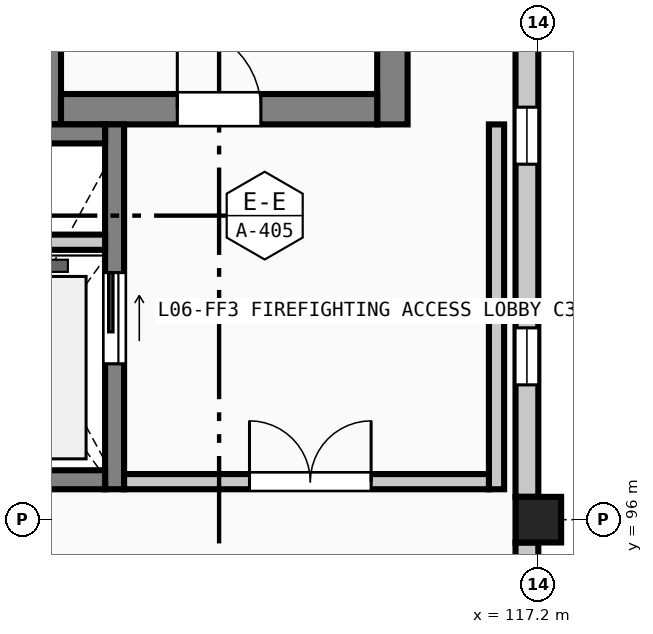
"""IFC4 building model, lengths in metres.
Left out: names, types, materials, properties, quantities, classifications, styles, units other than length and angle.
Written with IfcOpenShell. Run it as: python <this file> out.ifc"""

import sys

from ifc_helpers import new_model, si_unit, direction, frame, frame_2d, origin, origin_2d, place, context, subcontext, project, spatial, rectangle, extrude, element, fill, save


model = new_model("IFC4")
c1 = context("Model", 3, precision=1e-05, world=origin(), true_north=direction((0.0, 1.0)))
c2 = subcontext(c1, "Body", "Model", "MODEL_VIEW")
j1 = project(units=[si_unit("LENGTHUNIT", "METRE"), si_unit("PLANEANGLEUNIT", "RADIAN")], contexts=[c1])
p1 = place(None, origin())
s1 = spatial("IfcSite", under=j1, at=p1, CompositionType="ELEMENT")
p2 = place(p1, origin())
s2 = spatial("IfcBuilding", under=s1, at=p2, CompositionType="ELEMENT")
p3 = place(p2, frame((0.0, 0.0, 27.84)))
s3 = spatial("IfcBuildingStorey", under=s2, at=p3, CompositionType="ELEMENT", Elevation=27.84)
p4 = place(p3, frame((117.2, 96.0, 0.0), z_axis=(0.0, 0.0, 1.0), x_axis=(1.0, 0.0, 0.0)))
e1 = element("IfcColumn", 1, at=p4, inside=s3, PredefinedType="COLUMN", context=c2, shape_type="SweptSolid", body=[
    extrude(rectangle(XDim=0.6, YDim=0.6, at=origin_2d()), origin(), (0.0, 0.0, 1.0), 4.48),
])
for number, where, z_axis, x_axis in (
    (2, (110.72, 101.2, 0.0), (0.0, 0.0, 1.0), (0.0, 1.0, 0.0)),
    (3, (115.28, 110.4, 0.0), (0.0, 0.0, 1.0), (0.0, -1.0, 0.0)),
):
    element("IfcWall", number, at=place(p3, frame(where, z_axis=z_axis, x_axis=x_axis)), inside=s3, PredefinedType="SHEAR", context=c2, shape_type="SweptSolid", body=[
        extrude(rectangle(XDim=9.2, YDim=0.4, at=frame_2d((4.6, 0.0))), origin(), (0.0, 0.0, 1.0), 4.28),
    ])
p5 = place(p3, frame((115.08, 101.4, 0.0), z_axis=(0.0, 0.0, 1.0), x_axis=(-1.0, 0.0, 0.0)))
e4 = element("IfcWall", 4, at=p5, inside=s3, PredefinedType="SHEAR", context=c2, shape_type="SweptSolid", body=[
    extrude(rectangle(XDim=4.16, YDim=0.4, at=frame_2d((2.08, 0.0))), origin(), (0.0, 0.0, 1.0), 4.28),
])
p6 = place(p5, frame((1.53, 0.0, 0.0)))
e5 = element("IfcOpeningElement", 5, at=p6, cuts=e4, PredefinedType="OPENING", context=c2, shape_type="SweptSolid", body=[
    extrude(rectangle(XDim=1.1, YDim=2.2, at=frame_2d((0.55, 1.1))), frame((0.0, 0.21, 0.0), z_axis=(0.0, -1.0, 0.0), x_axis=(1.0, 0.0, 0.0)), (0.0, 0.0, 1.0), 0.42),
])
p7 = place(p3, frame((111.625, 101.2, 0.0), z_axis=(0.0, 0.0, 1.0), x_axis=(0.0, -1.0, 0.0)))
e6 = element("IfcWall", 6, at=p7, inside=s3, PredefinedType="SOLIDWALL", context=c2, shape_type="SweptSolid", body=[
    extrude(rectangle(XDim=4.8, YDim=0.25, at=frame_2d((2.4, 0.0))), origin(), (0.0, 0.0, 1.0), 4.28),
])
p8 = place(p7, frame((1.95, 0.0, 0.0)))
e7 = element("IfcOpeningElement", 7, at=p8, cuts=e6, PredefinedType="OPENING", context=c2, shape_type="SweptSolid", body=[
    extrude(rectangle(XDim=1.2, YDim=2.2, at=frame_2d((0.6, 1.1))), frame((0.0, 0.135, 0.0), z_axis=(0.0, -1.0, 0.0), x_axis=(1.0, 0.0, 0.0)), (0.0, 0.0, 1.0), 0.27),
])
for number, where, z_axis, x_axis in (
    (8, (111.5, 96.525, 0.0), (0.0, 0.0, 1.0), (-1.0, 0.0, 0.0)),
    (9, (109.4, 101.075, 0.0), (0.0, 0.0, 1.0), (1.0, 0.0, 0.0)),
):
    element("IfcWall", number, at=place(p3, frame(where, z_axis=z_axis, x_axis=x_axis)), inside=s3, PredefinedType="SOLIDWALL", context=c2, shape_type="SweptSolid", body=[
        extrude(rectangle(XDim=2.1, YDim=0.25, at=frame_2d((1.05, 0.0))), origin(), (0.0, 0.0, 1.0), 4.28),
    ])
p9 = place(p3, frame((109.4, 99.65, 0.0), z_axis=(0.0, 0.0, 1.0), x_axis=(1.0, 0.0, 0.0)))
e10 = element("IfcWall", 10, at=p9, inside=s3, PredefinedType="SOLIDWALL", context=c2, shape_type="SweptSolid", body=[
    extrude(rectangle(XDim=2.1, YDim=0.2, at=frame_2d((1.05, 0.0))), origin(), (0.0, 0.0, 1.0), 4.28),
])
p10 = place(p3, frame((116.65, 101.2, 0.0), z_axis=(0.0, 0.0, 1.0), x_axis=(0.0, -1.0, 0.0)))
e11 = element("IfcWall", 11, at=p10, inside=s3, PredefinedType="SOLIDWALL", context=c2, shape_type="SweptSolid", body=[
    extrude(rectangle(XDim=4.8, YDim=0.2, at=frame_2d((2.4, 0.0))), origin(), (0.0, 0.0, 1.0), 4.28),
])
p11 = place(p3, frame((116.55, 96.5, 0.0), z_axis=(0.0, 0.0, 1.0), x_axis=(-1.0, 0.0, 0.0)))
e12 = element("IfcWall", 12, at=p11, inside=s3, PredefinedType="SOLIDWALL", context=c2, shape_type="SweptSolid", body=[
    extrude(rectangle(XDim=4.8, YDim=0.2, at=frame_2d((2.4, 0.0))), origin(), (0.0, 0.0, 1.0), 4.28),
])
p12 = place(p11, frame((1.55, 0.0, 0.0)))
e13 = element("IfcOpeningElement", 13, at=p12, cuts=e12, PredefinedType="OPENING", context=c2, shape_type="SweptSolid", body=[
    extrude(rectangle(XDim=1.6, YDim=2.2, at=frame_2d((0.8, 1.1))), frame((0.0, 0.11, 0.0), z_axis=(0.0, -1.0, 0.0), x_axis=(1.0, 0.0, 0.0)), (0.0, 0.0, 1.0), 0.22),
])
p13 = place(p3, frame((117.05, 102.9, 0.0), z_axis=(0.0, 0.0, 1.0), x_axis=(0.0, -1.0, 0.0)))
e14 = element("IfcWall", 14, at=p13, inside=s3, PredefinedType="SOLIDWALL", context=c2, shape_type="SweptSolid", body=[
    extrude(rectangle(XDim=6.6, YDim=0.3, at=frame_2d((3.3, 0.0))), origin(), (0.0, 0.0, 1.0), 3.53),
])
p14 = place(p13, frame((1.473, 0.0, 0.9)))
e15 = element("IfcOpeningElement", 15, at=p14, cuts=e14, PredefinedType="OPENING", context=c2, shape_type="SweptSolid", body=[
    extrude(rectangle(XDim=0.75, YDim=2.4, at=frame_2d((0.375, 1.2))), frame((0.0, 0.16, 0.0), z_axis=(0.0, -1.0, 0.0), x_axis=(1.0, 0.0, 0.0)), (0.0, 0.0, 1.0), 0.32),
])
p15 = place(p13, frame((4.377, 0.0, 0.9)))
e16 = element("IfcOpeningElement", 16, at=p15, cuts=e14, PredefinedType="OPENING", context=c2, shape_type="SweptSolid", body=[
    extrude(rectangle(XDim=0.75, YDim=2.4, at=frame_2d((0.375, 1.2))), frame((0.0, 0.16, 0.0), z_axis=(0.0, -1.0, 0.0), x_axis=(1.0, 0.0, 0.0)), (0.0, 0.0, 1.0), 0.32),
])
p16 = place(p3, frame((117.05, 95.7, 0.0), z_axis=(0.0, 0.0, 1.0), x_axis=(0.0, -1.0, 0.0)))
e17 = element("IfcWall", 17, at=p16, inside=s3, PredefinedType="SOLIDWALL", context=c2, shape_type="SweptSolid", body=[
    extrude(rectangle(XDim=3.8, YDim=0.3, at=frame_2d((1.9, 0.0))), origin(), (0.0, 0.0, 1.0), 3.53),
])
p17 = place(p6, frame((1.1, 0.0, 0.0), z_axis=(0.0, 0.0, 1.0), x_axis=(-1.0, 0.0, 0.0)))
e18 = element("IfcDoor", 18, at=p17, inside=s3, OperationType="SINGLE_SWING_LEFT", PredefinedType="DOOR", context=c2, shape_type="SweptSolid", body=[
    extrude(rectangle(XDim=1.1, YDim=2.2, at=frame_2d((0.55, 1.1))), frame((0.0, 0.025, 0.0), z_axis=(0.0, -1.0, 0.0), x_axis=(1.0, 0.0, 0.0)), (0.0, 0.0, 1.0), 0.05),
])
fill(e5, e18)
p18 = place(p8, origin())
e19 = element("IfcDoor", 19, at=p18, inside=s3, OperationType="SLIDING_TO_LEFT", PredefinedType="DOOR", context=c2, shape_type="SweptSolid", body=[
    extrude(rectangle(XDim=1.2, YDim=2.2, at=frame_2d((0.6, 1.1))), frame((0.0, 0.025, 0.0), z_axis=(0.0, -1.0, 0.0), x_axis=(1.0, 0.0, 0.0)), (0.0, 0.0, 1.0), 0.05),
])
fill(e7, e19)
p19 = place(p12, frame((1.6, 0.0, 0.0), z_axis=(0.0, 0.0, 1.0), x_axis=(-1.0, 0.0, 0.0)))
e20 = element("IfcDoor", 20, at=p19, inside=s3, OperationType="DOUBLE_DOOR_SINGLE_SWING", PredefinedType="DOOR", context=c2, shape_type="SweptSolid", body=[
    extrude(rectangle(XDim=1.6, YDim=2.2, at=frame_2d((0.8, 1.1))), frame((0.0, 0.025, 0.0), z_axis=(0.0, -1.0, 0.0), x_axis=(1.0, 0.0, 0.0)), (0.0, 0.0, 1.0), 0.05),
])
fill(e13, e20)
p20 = place(p14, origin())
e21 = element("IfcWindow", 21, at=p20, inside=s3, PartitioningType="SINGLE_PANEL", PredefinedType="WINDOW", context=c2, shape_type="SweptSolid", body=[
    extrude(rectangle(XDim=0.75, YDim=2.4, at=frame_2d((0.375, 1.2))), frame((0.0, 0.03, 0.0), z_axis=(0.0, -1.0, 0.0), x_axis=(1.0, 0.0, 0.0)), (0.0, 0.0, 1.0), 0.06),
])
fill(e15, e21)
p21 = place(p15, origin())
e22 = element("IfcWindow", 22, at=p21, inside=s3, PartitioningType="SINGLE_PANEL", PredefinedType="WINDOW", context=c2, shape_type="SweptSolid", body=[
    extrude(rectangle(XDim=0.75, YDim=2.4, at=frame_2d((0.375, 1.2))), frame((0.0, 0.03, 0.0), z_axis=(0.0, -1.0, 0.0), x_axis=(1.0, 0.0, 0.0)), (0.0, 0.0, 1.0), 0.06),
])
fill(e16, e22)
save(model, sys.argv[1])
